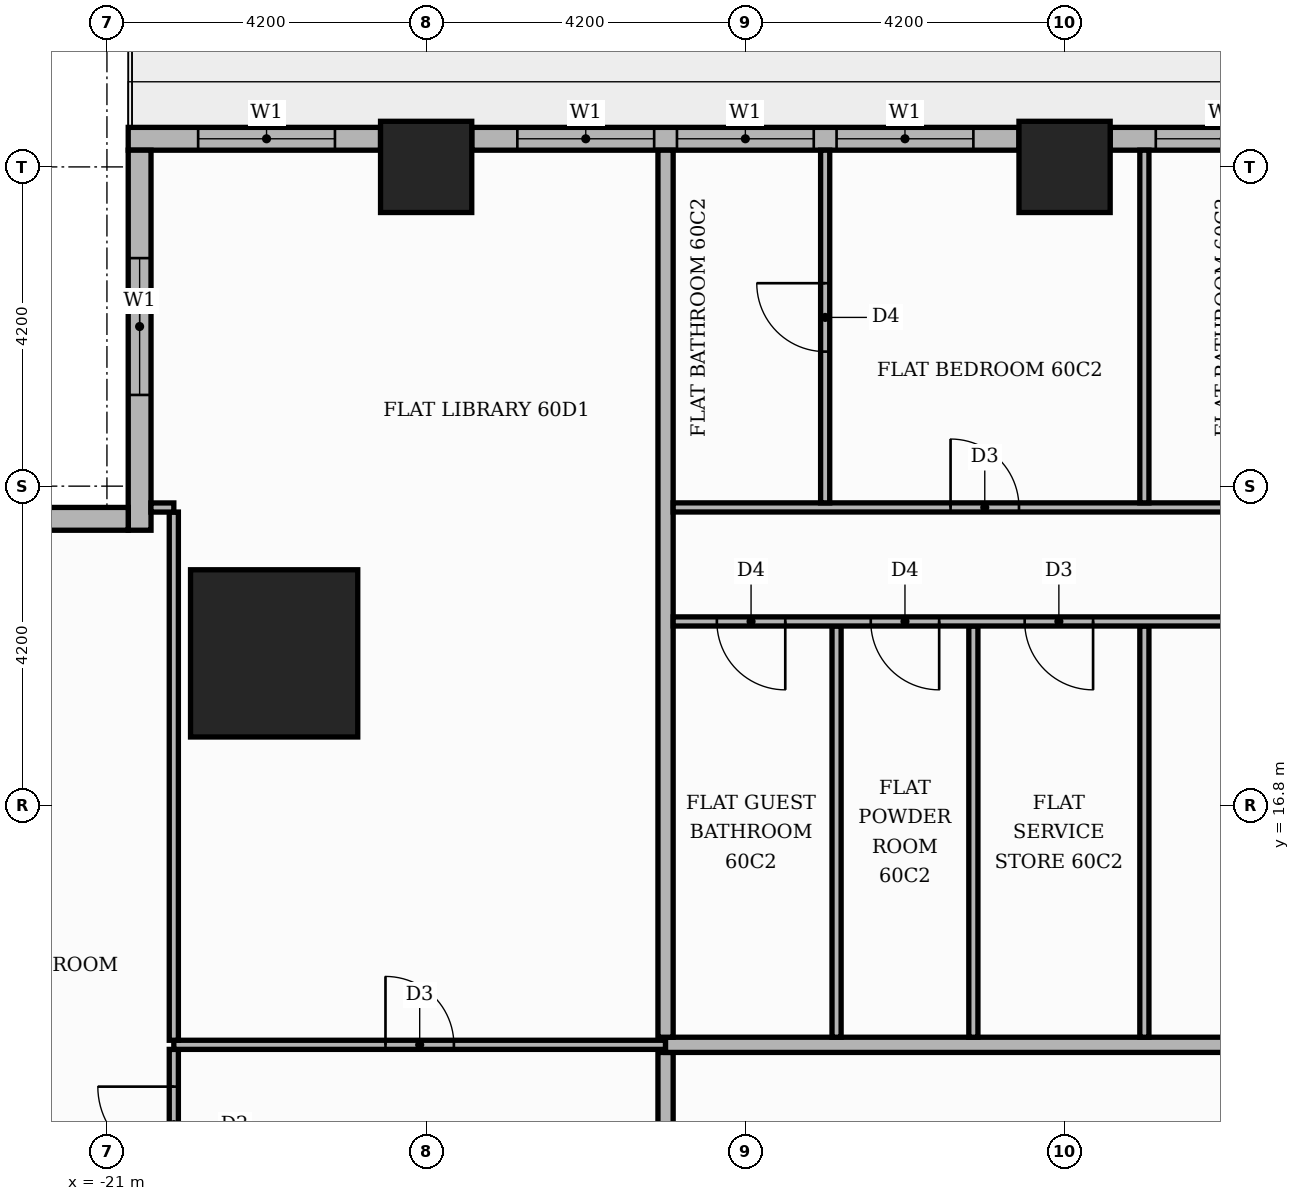
"""IFC4 building model, lengths in metres.
Left out: names, types, materials, properties, quantities, classifications, styles, units other than length and angle.
Written with IfcOpenShell. Run it as: python <this file> out.ifc"""

import sys

from ifc_helpers import new_model, si_unit, direction, frame, frame_2d, origin, origin_2d, place, context, subcontext, project, spatial, rectangle, extrude, element, fill, save


model = new_model("IFC4")
c1 = context("Model", 3, precision=1e-05, world=origin(), true_north=direction((0.0, 1.0)))
c2 = subcontext(c1, "Body", "Model", "MODEL_VIEW")
j1 = project(units=[si_unit("LENGTHUNIT", "METRE"), si_unit("PLANEANGLEUNIT", "RADIAN")], contexts=[c1])
p1 = place(None, origin())
s1 = spatial("IfcSite", under=j1, at=p1, CompositionType="ELEMENT")
p2 = place(p1, origin())
s2 = spatial("IfcBuilding", under=s1, at=p2, CompositionType="ELEMENT")
p3 = place(p2, frame((0.0, 0.0, 252.3)))
s3 = spatial("IfcBuildingStorey", under=s2, at=p3, CompositionType="ELEMENT", Elevation=252.3)
p4 = place(p3, frame((-18.8, 18.8, 0.0), z_axis=(0.0, 0.0, 1.0), x_axis=(1.0, 0.0, 0.0)))
e1 = element("IfcColumn", 1, at=p4, inside=s3, PredefinedType="COLUMN", context=c2, shape_type="SweptSolid", body=[
    extrude(rectangle(XDim=2.2, YDim=2.2, at=origin_2d()), origin(), (0.0, 0.0, 1.0), 3.9),
])
for number, where, z_axis, x_axis in (
    (2, (-8.4, 25.2, 0.0), (0.0, 0.0, 1.0), (1.0, 0.0, 0.0)),
    (3, (-16.8, 25.2, 0.0), (0.0, 0.0, 1.0), (1.0, 0.0, 0.0)),
):
    element("IfcColumn", number, at=place(p3, frame(where, z_axis=z_axis, x_axis=x_axis)), inside=s3, PredefinedType="COLUMN", context=c2, shape_type="SweptSolid", body=[
        extrude(rectangle(XDim=1.2, YDim=1.2, at=origin_2d()), origin(), (0.0, 0.0, 1.0), 3.9),
    ])
p5 = place(p3, frame((-0.6, 25.57, 0.0), z_axis=(0.0, 0.0, 1.0), x_axis=(-1.0, 0.0, 0.0)))
e4 = element("IfcWall", 4, at=p5, inside=s3, PredefinedType="STANDARD", context=c2, shape_type="SweptSolid", body=[
    extrude(rectangle(XDim=7.2, YDim=0.3, at=frame_2d((3.6, 0.0))), origin(), (0.0, 0.0, 1.0), 3.48),
])
p6 = place(p5, frame((0.6, 0.0, 0.0)))
e5 = element("IfcOpeningElement", 5, at=p6, cuts=e4, PredefinedType="OPENING", context=c2, shape_type="SweptSolid", body=[
    extrude(rectangle(XDim=1.8, YDim=2.4, at=frame_2d((0.9, 1.2))), frame((0.0, 0.16, 0.0), z_axis=(0.0, -1.0, 0.0), x_axis=(1.0, 0.0, 0.0)), (0.0, 0.0, 1.0), 0.32),
])
p7 = place(p5, frame((2.7, 0.0, 0.9)))
e6 = element("IfcOpeningElement", 6, at=p7, cuts=e4, PredefinedType="OPENING", context=c2, shape_type="SweptSolid", body=[
    extrude(rectangle(XDim=1.8, YDim=2.1, at=frame_2d((0.9, 1.05))), frame((0.0, 0.16, 0.0), z_axis=(0.0, -1.0, 0.0), x_axis=(1.0, 0.0, 0.0)), (0.0, 0.0, 1.0), 0.32),
])
p8 = place(p5, frame((4.8, 0.0, 0.9)))
e7 = element("IfcOpeningElement", 7, at=p8, cuts=e4, PredefinedType="OPENING", context=c2, shape_type="SweptSolid", body=[
    extrude(rectangle(XDim=1.8, YDim=2.1, at=frame_2d((0.9, 1.05))), frame((0.0, 0.16, 0.0), z_axis=(0.0, -1.0, 0.0), x_axis=(1.0, 0.0, 0.0)), (0.0, 0.0, 1.0), 0.32),
])
p9 = place(p3, frame((-9.0, 25.57, 0.0), z_axis=(0.0, 0.0, 1.0), x_axis=(-1.0, 0.0, 0.0)))
e8 = element("IfcWall", 8, at=p9, inside=s3, PredefinedType="STANDARD", context=c2, shape_type="SweptSolid", body=[
    extrude(rectangle(XDim=7.2, YDim=0.3, at=frame_2d((3.6, 0.0))), origin(), (0.0, 0.0, 1.0), 3.48),
])
p10 = place(p9, frame((0.6, 0.0, 0.9)))
e9 = element("IfcOpeningElement", 9, at=p10, cuts=e8, PredefinedType="OPENING", context=c2, shape_type="SweptSolid", body=[
    extrude(rectangle(XDim=1.8, YDim=2.1, at=frame_2d((0.9, 1.05))), frame((0.0, 0.16, 0.0), z_axis=(0.0, -1.0, 0.0), x_axis=(1.0, 0.0, 0.0)), (0.0, 0.0, 1.0), 0.32),
])
p11 = place(p9, frame((2.7, 0.0, 0.9)))
e10 = element("IfcOpeningElement", 10, at=p11, cuts=e8, PredefinedType="OPENING", context=c2, shape_type="SweptSolid", body=[
    extrude(rectangle(XDim=1.8, YDim=2.1, at=frame_2d((0.9, 1.05))), frame((0.0, 0.16, 0.0), z_axis=(0.0, -1.0, 0.0), x_axis=(1.0, 0.0, 0.0)), (0.0, 0.0, 1.0), 0.32),
])
p12 = place(p9, frame((4.8, 0.0, 0.9)))
e11 = element("IfcOpeningElement", 11, at=p12, cuts=e8, PredefinedType="OPENING", context=c2, shape_type="SweptSolid", body=[
    extrude(rectangle(XDim=1.8, YDim=2.1, at=frame_2d((0.9, 1.05))), frame((0.0, 0.16, 0.0), z_axis=(0.0, -1.0, 0.0), x_axis=(1.0, 0.0, 0.0)), (0.0, 0.0, 1.0), 0.32),
])
p13 = place(p3, frame((-17.4, 25.57, 0.0), z_axis=(0.0, 0.0, 1.0), x_axis=(-1.0, 0.0, 0.0)))
e12 = element("IfcWall", 12, at=p13, inside=s3, PredefinedType="STANDARD", context=c2, shape_type="SweptSolid", body=[
    extrude(rectangle(XDim=3.32, YDim=0.3, at=frame_2d((1.66, 0.0))), origin(), (0.0, 0.0, 1.0), 3.48),
])
p14 = place(p13, frame((0.6, 0.0, 0.9)))
e13 = element("IfcOpeningElement", 13, at=p14, cuts=e12, PredefinedType="OPENING", context=c2, shape_type="SweptSolid", body=[
    extrude(rectangle(XDim=1.8, YDim=2.1, at=frame_2d((0.9, 1.05))), frame((0.0, 0.16, 0.0), z_axis=(0.0, -1.0, 0.0), x_axis=(1.0, 0.0, 0.0)), (0.0, 0.0, 1.0), 0.32),
])
p15 = place(p3, frame((-20.57, 25.42, 0.0), z_axis=(0.0, 0.0, 1.0), x_axis=(0.0, -1.0, 0.0)))
e14 = element("IfcWall", 14, at=p15, inside=s3, PredefinedType="STANDARD", context=c2, shape_type="SweptSolid", body=[
    extrude(rectangle(XDim=5.0, YDim=0.3, at=frame_2d((2.5, 0.0))), origin(), (0.0, 0.0, 1.0), 3.48),
])
p16 = place(p15, frame((1.42, 0.0, 0.9)))
e15 = element("IfcOpeningElement", 15, at=p16, cuts=e14, PredefinedType="OPENING", context=c2, shape_type="SweptSolid", body=[
    extrude(rectangle(XDim=1.8, YDim=2.1, at=frame_2d((0.9, 1.05))), frame((0.0, 0.16, 0.0), z_axis=(0.0, -1.0, 0.0), x_axis=(1.0, 0.0, 0.0)), (0.0, 0.0, 1.0), 0.32),
])
p17 = place(p3, frame((-20.72, 20.57, 0.0), z_axis=(0.0, 0.0, 1.0), x_axis=(-1.0, 0.0, 0.0)))
e16 = element("IfcWall", 16, at=p17, inside=s3, PredefinedType="STANDARD", context=c2, shape_type="SweptSolid", body=[
    extrude(rectangle(XDim=5.0, YDim=0.3, at=frame_2d((2.5, 0.0))), origin(), (0.0, 0.0, 1.0), 3.48),
])
p18 = place(p17, frame((1.48, 0.0, 0.9)))
e17 = element("IfcOpeningElement", 17, at=p18, cuts=e16, PredefinedType="OPENING", context=c2, shape_type="SweptSolid", body=[
    extrude(rectangle(XDim=1.8, YDim=2.1, at=frame_2d((0.9, 1.05))), frame((0.0, 0.16, 0.0), z_axis=(0.0, -1.0, 0.0), x_axis=(1.0, 0.0, 0.0)), (0.0, 0.0, 1.0), 0.32),
])
p19 = place(p3, frame((-13.65, 11.1, 0.0), z_axis=(0.0, 0.0, 1.0), x_axis=(0.0, 1.0, 0.0)))
e18 = element("IfcWall", 18, at=p19, inside=s3, PredefinedType="PARTITIONING", context=c2, shape_type="SweptSolid", body=[
    extrude(rectangle(XDim=2.45, YDim=0.2, at=frame_2d((1.225, 0.0))), origin(), (0.0, 0.0, 1.0), 3.48),
])
p20 = place(p3, frame((-20.12, 11.61, 0.0), z_axis=(0.0, 0.0, 1.0), x_axis=(0.0, 1.0, 0.0)))
e19 = element("IfcWall", 19, at=p20, inside=s3, PredefinedType="PARTITIONING", context=c2, shape_type="SweptSolid", body=[
    extrude(rectangle(XDim=1.98, YDim=0.12, at=frame_2d((0.99, 0.0))), origin(), (0.0, 0.0, 1.0), 3.48),
])
p21 = place(p20, frame((0.49, 0.0, 0.0)))
e20 = element("IfcOpeningElement", 20, at=p21, cuts=e19, PredefinedType="OPENING", context=c2, shape_type="SweptSolid", body=[
    extrude(rectangle(XDim=1.0, YDim=2.1, at=frame_2d((0.5, 1.05))), frame((0.0, 0.07, 0.0), z_axis=(0.0, -1.0, 0.0), x_axis=(1.0, 0.0, 0.0)), (0.0, 0.0, 1.0), 0.14),
])
p22 = place(p3, frame((-20.12, 13.65, 0.0), z_axis=(0.0, 0.0, 1.0), x_axis=(1.0, 0.0, 0.0)))
e21 = element("IfcWall", 21, at=p22, inside=s3, PredefinedType="PARTITIONING", context=c2, shape_type="SweptSolid", body=[
    extrude(rectangle(XDim=6.47, YDim=0.12, at=frame_2d((3.235, 0.0))), origin(), (0.0, 0.0, 1.0), 3.48),
])
p23 = place(p22, frame((2.785, 0.0, 0.0)))
e22 = element("IfcOpeningElement", 22, at=p23, cuts=e21, PredefinedType="OPENING", context=c2, shape_type="SweptSolid", body=[
    extrude(rectangle(XDim=0.9, YDim=2.1, at=frame_2d((0.45, 1.05))), frame((0.0, 0.07, 0.0), z_axis=(0.0, -1.0, 0.0), x_axis=(1.0, 0.0, 0.0)), (0.0, 0.0, 1.0), 0.14),
])
p24 = place(p3, frame((-13.65, 13.65, 0.0), z_axis=(0.0, 0.0, 1.0), x_axis=(1.0, 0.0, 0.0)))
e23 = element("IfcWall", 23, at=p24, inside=s3, PredefinedType="PARTITIONING", context=c2, shape_type="SweptSolid", body=[
    extrude(rectangle(XDim=39.07, YDim=0.2, at=frame_2d((19.535, 0.0))), origin(), (0.0, 0.0, 1.0), 3.48),
])
p25 = place(p24, frame((24.65, 0.0, 0.0)))
e24 = element("IfcOpeningElement", 24, at=p25, cuts=e23, PredefinedType="OPENING", context=c2, shape_type="SweptSolid", body=[
    extrude(rectangle(XDim=1.1, YDim=2.4, at=frame_2d((0.55, 1.2))), frame((0.0, 0.11, 0.0), z_axis=(0.0, -1.0, 0.0), x_axis=(1.0, 0.0, 0.0)), (0.0, 0.0, 1.0), 0.22),
])
p26 = place(p24, frame((14.15, 0.0, 0.0)))
e25 = element("IfcOpeningElement", 25, at=p26, cuts=e23, PredefinedType="OPENING", context=c2, shape_type="SweptSolid", body=[
    extrude(rectangle(XDim=1.1, YDim=2.4, at=frame_2d((0.55, 1.2))), frame((0.0, 0.11, 0.0), z_axis=(0.0, -1.0, 0.0), x_axis=(1.0, 0.0, 0.0)), (0.0, 0.0, 1.0), 0.22),
])
p27 = place(p3, frame((-20.12, 13.71, 0.0), z_axis=(0.0, 0.0, 1.0), x_axis=(0.0, 1.0, 0.0)))
e26 = element("IfcWall", 26, at=p27, inside=s3, PredefinedType="PARTITIONING", context=c2, shape_type="SweptSolid", body=[
    extrude(rectangle(XDim=6.949, YDim=0.12, at=frame_2d((3.475, 0.0))), origin(), (0.0, 0.0, 1.0), 3.48),
])
p28 = place(p3, frame((-13.65, 13.75, 0.0), z_axis=(0.0, 0.0, 1.0), x_axis=(0.0, 1.0, 0.0)))
e27 = element("IfcWall", 27, at=p28, inside=s3, PredefinedType="PARTITIONING", context=c2, shape_type="SweptSolid", body=[
    extrude(rectangle(XDim=11.67, YDim=0.2, at=frame_2d((5.835, 0.0))), origin(), (0.0, 0.0, 1.0), 3.48),
])
for number, where, z_axis, x_axis in (
    (28, (-11.4, 13.75, 0.0), (0.0, 0.0, 1.0), (0.0, 1.0, 0.0)),
    (29, (-9.6, 13.75, 0.0), (0.0, 0.0, 1.0), (0.0, 1.0, 0.0)),
    (30, (-7.35, 13.75, 0.0), (0.0, 0.0, 1.0), (0.0, 1.0, 0.0)),
):
    element("IfcWall", number, at=place(p3, frame(where, z_axis=z_axis, x_axis=x_axis)), inside=s3, PredefinedType="PARTITIONING", context=c2, shape_type="SweptSolid", body=[
        extrude(rectangle(XDim=5.41, YDim=0.12, at=frame_2d((2.705, 0.0))), origin(), (0.0, 0.0, 1.0), 3.48),
    ])
p29 = place(p3, frame((-13.55, 19.22, 0.0), z_axis=(0.0, 0.0, 1.0), x_axis=(1.0, 0.0, 0.0)))
e31 = element("IfcWall", 31, at=p29, inside=s3, PredefinedType="PARTITIONING", context=c2, shape_type="SweptSolid", body=[
    extrude(rectangle(XDim=12.5, YDim=0.12, at=frame_2d((6.25, 0.0))), origin(), (0.0, 0.0, 1.0), 3.48),
])
p30 = place(p29, frame((8.9, 0.0, 0.0)))
e32 = element("IfcOpeningElement", 32, at=p30, cuts=e31, PredefinedType="OPENING", context=c2, shape_type="SweptSolid", body=[
    extrude(rectangle(XDim=0.9, YDim=2.1, at=frame_2d((0.45, 1.05))), frame((0.0, 0.07, 0.0), z_axis=(0.0, -1.0, 0.0), x_axis=(1.0, 0.0, 0.0)), (0.0, 0.0, 1.0), 0.14),
])
p31 = place(p29, frame((4.625, 0.0, 0.0)))
e33 = element("IfcOpeningElement", 33, at=p31, cuts=e31, PredefinedType="OPENING", context=c2, shape_type="SweptSolid", body=[
    extrude(rectangle(XDim=0.9, YDim=2.1, at=frame_2d((0.45, 1.05))), frame((0.0, 0.07, 0.0), z_axis=(0.0, -1.0, 0.0), x_axis=(1.0, 0.0, 0.0)), (0.0, 0.0, 1.0), 0.14),
])
p32 = place(p29, frame((2.6, 0.0, 0.0)))
e34 = element("IfcOpeningElement", 34, at=p32, cuts=e31, PredefinedType="OPENING", context=c2, shape_type="SweptSolid", body=[
    extrude(rectangle(XDim=0.9, YDim=2.1, at=frame_2d((0.45, 1.05))), frame((0.0, 0.07, 0.0), z_axis=(0.0, -1.0, 0.0), x_axis=(1.0, 0.0, 0.0)), (0.0, 0.0, 1.0), 0.14),
])
p33 = place(p29, frame((0.575, 0.0, 0.0)))
e35 = element("IfcOpeningElement", 35, at=p33, cuts=e31, PredefinedType="OPENING", context=c2, shape_type="SweptSolid", body=[
    extrude(rectangle(XDim=0.9, YDim=2.1, at=frame_2d((0.45, 1.05))), frame((0.0, 0.07, 0.0), z_axis=(0.0, -1.0, 0.0), x_axis=(1.0, 0.0, 0.0)), (0.0, 0.0, 1.0), 0.14),
])
p34 = place(p3, frame((-20.421, 20.719, 0.0), z_axis=(0.0, 0.0, 1.0), x_axis=(1.0, 0.0, 0.0)))
e36 = element("IfcWall", 36, at=p34, inside=s3, PredefinedType="PARTITIONING", context=c2, shape_type="SweptSolid", body=[
    extrude(rectangle(XDim=0.301, YDim=0.12, at=frame_2d((0.15, 0.0))), origin(), (0.0, 0.0, 1.0), 3.48),
])
p35 = place(p3, frame((-13.55, 20.72, 0.0), z_axis=(0.0, 0.0, 1.0), x_axis=(1.0, 0.0, 0.0)))
e37 = element("IfcWall", 37, at=p35, inside=s3, PredefinedType="PARTITIONING", context=c2, shape_type="SweptSolid", body=[
    extrude(rectangle(XDim=18.7, YDim=0.12, at=frame_2d((9.35, 0.0))), origin(), (0.0, 0.0, 1.0), 3.48),
])
p36 = place(p35, frame((16.2, 0.0, 0.0)))
e38 = element("IfcOpeningElement", 38, at=p36, cuts=e37, PredefinedType="OPENING", context=c2, shape_type="SweptSolid", body=[
    extrude(rectangle(XDim=1.0, YDim=2.1, at=frame_2d((0.5, 1.05))), frame((0.0, 0.07, 0.0), z_axis=(0.0, -1.0, 0.0), x_axis=(1.0, 0.0, 0.0)), (0.0, 0.0, 1.0), 0.14),
])
p37 = place(p35, frame((12.05, 0.0, 0.0)))
e39 = element("IfcOpeningElement", 39, at=p37, cuts=e37, PredefinedType="OPENING", context=c2, shape_type="SweptSolid", body=[
    extrude(rectangle(XDim=0.9, YDim=2.1, at=frame_2d((0.45, 1.05))), frame((0.0, 0.07, 0.0), z_axis=(0.0, -1.0, 0.0), x_axis=(1.0, 0.0, 0.0)), (0.0, 0.0, 1.0), 0.14),
])
p38 = place(p35, frame((3.65, 0.0, 0.0)))
e40 = element("IfcOpeningElement", 40, at=p38, cuts=e37, PredefinedType="OPENING", context=c2, shape_type="SweptSolid", body=[
    extrude(rectangle(XDim=0.9, YDim=2.1, at=frame_2d((0.45, 1.05))), frame((0.0, 0.07, 0.0), z_axis=(0.0, -1.0, 0.0), x_axis=(1.0, 0.0, 0.0)), (0.0, 0.0, 1.0), 0.14),
])
p39 = place(p3, frame((-11.55, 20.78, 0.0), z_axis=(0.0, 0.0, 1.0), x_axis=(0.0, 1.0, 0.0)))
e41 = element("IfcWall", 41, at=p39, inside=s3, PredefinedType="PARTITIONING", context=c2, shape_type="SweptSolid", body=[
    extrude(rectangle(XDim=4.64, YDim=0.12, at=frame_2d((2.32, 0.0))), origin(), (0.0, 0.0, 1.0), 3.48),
])
p40 = place(p39, frame((1.99, 0.0, 0.0)))
e42 = element("IfcOpeningElement", 42, at=p40, cuts=e41, PredefinedType="OPENING", context=c2, shape_type="SweptSolid", body=[
    extrude(rectangle(XDim=0.9, YDim=2.1, at=frame_2d((0.45, 1.05))), frame((0.0, 0.07, 0.0), z_axis=(0.0, -1.0, 0.0), x_axis=(1.0, 0.0, 0.0)), (0.0, 0.0, 1.0), 0.14),
])
p41 = place(p3, frame((-7.35, 20.78, 0.0), z_axis=(0.0, 0.0, 1.0), x_axis=(0.0, 1.0, 0.0)))
e43 = element("IfcWall", 43, at=p41, inside=s3, PredefinedType="PARTITIONING", context=c2, shape_type="SweptSolid", body=[
    extrude(rectangle(XDim=4.64, YDim=0.12, at=frame_2d((2.32, 0.0))), origin(), (0.0, 0.0, 1.0), 3.48),
])
p42 = place(p8, origin())
e44 = element("IfcWindow", 44, at=p42, inside=s3, PartitioningType="SINGLE_PANEL", PredefinedType="WINDOW", context=c2, shape_type="SweptSolid", body=[
    extrude(rectangle(XDim=1.8, YDim=2.1, at=frame_2d((0.9, 1.05))), frame((0.0, 0.03, 0.0), z_axis=(0.0, -1.0, 0.0), x_axis=(1.0, 0.0, 0.0)), (0.0, 0.0, 1.0), 0.06),
])
fill(e7, e44)
p43 = place(p10, origin())
e45 = element("IfcWindow", 45, at=p43, inside=s3, PartitioningType="SINGLE_PANEL", PredefinedType="WINDOW", context=c2, shape_type="SweptSolid", body=[
    extrude(rectangle(XDim=1.8, YDim=2.1, at=frame_2d((0.9, 1.05))), frame((0.0, 0.03, 0.0), z_axis=(0.0, -1.0, 0.0), x_axis=(1.0, 0.0, 0.0)), (0.0, 0.0, 1.0), 0.06),
])
fill(e9, e45)
p44 = place(p11, origin())
e46 = element("IfcWindow", 46, at=p44, inside=s3, PartitioningType="SINGLE_PANEL", PredefinedType="WINDOW", context=c2, shape_type="SweptSolid", body=[
    extrude(rectangle(XDim=1.8, YDim=2.1, at=frame_2d((0.9, 1.05))), frame((0.0, 0.03, 0.0), z_axis=(0.0, -1.0, 0.0), x_axis=(1.0, 0.0, 0.0)), (0.0, 0.0, 1.0), 0.06),
])
fill(e10, e46)
p45 = place(p12, origin())
e47 = element("IfcWindow", 47, at=p45, inside=s3, PartitioningType="SINGLE_PANEL", PredefinedType="WINDOW", context=c2, shape_type="SweptSolid", body=[
    extrude(rectangle(XDim=1.8, YDim=2.1, at=frame_2d((0.9, 1.05))), frame((0.0, 0.03, 0.0), z_axis=(0.0, -1.0, 0.0), x_axis=(1.0, 0.0, 0.0)), (0.0, 0.0, 1.0), 0.06),
])
fill(e11, e47)
p46 = place(p14, origin())
e48 = element("IfcWindow", 48, at=p46, inside=s3, PartitioningType="SINGLE_PANEL", PredefinedType="WINDOW", context=c2, shape_type="SweptSolid", body=[
    extrude(rectangle(XDim=1.8, YDim=2.1, at=frame_2d((0.9, 1.05))), frame((0.0, 0.03, 0.0), z_axis=(0.0, -1.0, 0.0), x_axis=(1.0, 0.0, 0.0)), (0.0, 0.0, 1.0), 0.06),
])
fill(e13, e48)
p47 = place(p16, origin())
e49 = element("IfcWindow", 49, at=p47, inside=s3, PartitioningType="SINGLE_PANEL", PredefinedType="WINDOW", context=c2, shape_type="SweptSolid", body=[
    extrude(rectangle(XDim=1.8, YDim=2.1, at=frame_2d((0.9, 1.05))), frame((0.0, 0.03, 0.0), z_axis=(0.0, -1.0, 0.0), x_axis=(1.0, 0.0, 0.0)), (0.0, 0.0, 1.0), 0.06),
])
fill(e15, e49)
p48 = place(p31, frame((0.9, 0.0, 0.0), z_axis=(0.0, 0.0, 1.0), x_axis=(-1.0, 0.0, 0.0)))
e50 = element("IfcDoor", 50, at=p48, inside=s3, OperationType="SINGLE_SWING_RIGHT", PredefinedType="DOOR", context=c2, shape_type="SweptSolid", body=[
    extrude(rectangle(XDim=0.9, YDim=2.1, at=frame_2d((0.45, 1.05))), frame((0.0, 0.025, 0.0), z_axis=(0.0, -1.0, 0.0), x_axis=(1.0, 0.0, 0.0)), (0.0, 0.0, 1.0), 0.05),
])
fill(e33, e50)
p49 = place(p32, frame((0.9, 0.0, 0.0), z_axis=(0.0, 0.0, 1.0), x_axis=(-1.0, 0.0, 0.0)))
e51 = element("IfcDoor", 51, at=p49, inside=s3, OperationType="SINGLE_SWING_RIGHT", PredefinedType="DOOR", context=c2, shape_type="SweptSolid", body=[
    extrude(rectangle(XDim=0.9, YDim=2.1, at=frame_2d((0.45, 1.05))), frame((0.0, 0.025, 0.0), z_axis=(0.0, -1.0, 0.0), x_axis=(1.0, 0.0, 0.0)), (0.0, 0.0, 1.0), 0.05),
])
fill(e34, e51)
p50 = place(p33, frame((0.9, 0.0, 0.0), z_axis=(0.0, 0.0, 1.0), x_axis=(-1.0, 0.0, 0.0)))
e52 = element("IfcDoor", 52, at=p50, inside=s3, OperationType="SINGLE_SWING_RIGHT", PredefinedType="DOOR", context=c2, shape_type="SweptSolid", body=[
    extrude(rectangle(XDim=0.9, YDim=2.1, at=frame_2d((0.45, 1.05))), frame((0.0, 0.025, 0.0), z_axis=(0.0, -1.0, 0.0), x_axis=(1.0, 0.0, 0.0)), (0.0, 0.0, 1.0), 0.05),
])
fill(e35, e52)
p51 = place(p38, origin())
e53 = element("IfcDoor", 53, at=p51, inside=s3, OperationType="SINGLE_SWING_LEFT", PredefinedType="DOOR", context=c2, shape_type="SweptSolid", body=[
    extrude(rectangle(XDim=0.9, YDim=2.1, at=frame_2d((0.45, 1.05))), frame((0.0, 0.025, 0.0), z_axis=(0.0, -1.0, 0.0), x_axis=(1.0, 0.0, 0.0)), (0.0, 0.0, 1.0), 0.05),
])
fill(e40, e53)
p52 = place(p40, origin())
e54 = element("IfcDoor", 54, at=p52, inside=s3, OperationType="SINGLE_SWING_RIGHT", PredefinedType="DOOR", context=c2, shape_type="SweptSolid", body=[
    extrude(rectangle(XDim=0.9, YDim=2.1, at=frame_2d((0.45, 1.05))), frame((0.0, 0.025, 0.0), z_axis=(0.0, -1.0, 0.0), x_axis=(1.0, 0.0, 0.0)), (0.0, 0.0, 1.0), 0.05),
])
fill(e42, e54)
p53 = place(p23, origin())
e55 = element("IfcDoor", 55, at=p53, inside=s3, OperationType="SINGLE_SWING_LEFT", PredefinedType="DOOR", context=c2, shape_type="SweptSolid", body=[
    extrude(rectangle(XDim=0.9, YDim=2.1, at=frame_2d((0.45, 1.05))), frame((0.0, 0.025, 0.0), z_axis=(0.0, -1.0, 0.0), x_axis=(1.0, 0.0, 0.0)), (0.0, 0.0, 1.0), 0.05),
])
fill(e22, e55)
p54 = place(p21, origin())
e56 = element("IfcDoor", 56, at=p54, inside=s3, OperationType="SINGLE_SWING_RIGHT", PredefinedType="DOOR", context=c2, shape_type="SweptSolid", body=[
    extrude(rectangle(XDim=1.0, YDim=2.1, at=frame_2d((0.5, 1.05))), frame((0.0, 0.025, 0.0), z_axis=(0.0, -1.0, 0.0), x_axis=(1.0, 0.0, 0.0)), (0.0, 0.0, 1.0), 0.05),
])
fill(e20, e56)
save(model, sys.argv[1])
